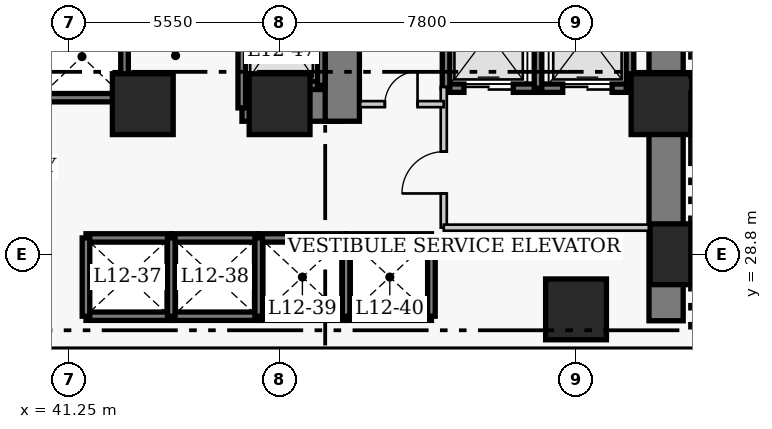
"""IFC4 building model, lengths in metres.
Left out: names, types, materials, properties, quantities, classifications, styles, units other than length and angle.
Written with IfcOpenShell. Run it as: python <this file> out.ifc"""

import sys

from ifc_helpers import new_model, si_unit, direction, frame, frame_2d, origin, origin_2d, place, context, subcontext, project, spatial, rectangle, extrude, element, fill, save


model = new_model("IFC4")
c1 = context("Model", 3, precision=1e-05, world=origin(), true_north=direction((0.0, 1.0)))
c2 = subcontext(c1, "Body", "Model", "MODEL_VIEW")
j1 = project(units=[si_unit("LENGTHUNIT", "METRE"), si_unit("PLANEANGLEUNIT", "RADIAN")], contexts=[c1])
p1 = place(None, origin())
s1 = spatial("IfcSite", under=j1, at=p1, CompositionType="ELEMENT")
p2 = place(p1, origin())
s2 = spatial("IfcBuilding", under=s1, at=p2, CompositionType="ELEMENT")
p3 = place(p2, frame((0.0, 0.0, 52.6)))
s3 = spatial("IfcBuildingStorey", under=s2, at=p3, CompositionType="ELEMENT", Elevation=52.6)
p4 = place(p3, frame((56.97, 27.05, 0.0), z_axis=(0.0, 0.0, 1.0), x_axis=(0.0, 1.0, 0.0)))
e1 = element("IfcWall", 1, at=p4, inside=s3, PredefinedType="SHEAR", context=c2, shape_type="SweptSolid", body=[
    extrude(rectangle(XDim=13.72, YDim=0.9, at=frame_2d((6.86, 0.0))), origin(), (0.0, 0.0, 1.0), 3.8),
])
p5 = place(p3, frame((45.81, 32.75, 0.0), z_axis=(0.0, 0.0, 1.0), x_axis=(1.0, 0.0, 0.0)))
e2 = element("IfcWall", 2, at=p5, inside=s3, PredefinedType="SHEAR", context=c2, shape_type="SweptSolid", body=[
    extrude(rectangle(XDim=2.64, YDim=0.9, at=frame_2d((1.32, 0.0))), origin(), (0.0, 0.0, 1.0), 3.8),
])
p6 = place(p3, frame((48.45, 32.3, 0.0), z_axis=(0.0, 0.0, 1.0), x_axis=(0.0, 1.0, 0.0)))
e3 = element("IfcWall", 3, at=p6, inside=s3, PredefinedType="SHEAR", context=c2, shape_type="SweptSolid", body=[
    extrude(rectangle(XDim=8.02, YDim=0.9, at=frame_2d((4.01, 0.0))), origin(), (0.0, 0.0, 1.0), 3.8),
])
p7 = place(p6, frame((5.9, 0.0, 0.0)))
e4 = element("IfcOpeningElement", 4, at=p7, cuts=e3, PredefinedType="OPENING", context=c2, shape_type="SweptSolid", body=[
    extrude(rectangle(XDim=1.1, YDim=2.15, at=frame_2d((0.55, 1.075))), frame((0.0, 0.46, 0.0), z_axis=(0.0, -1.0, 0.0), x_axis=(1.0, 0.0, 0.0)), (0.0, 0.0, 1.0), 0.92),
])
for number, where, z_axis, x_axis in (
    (5, (57.35, 28.8, 0.0), (0.0, 0.0, 1.0), (1.0, 0.0, 0.0)),
    (6, (43.2, 32.75, 0.0), (0.0, 0.0, 1.0), (1.0, 0.0, 0.0)),
    (7, (46.8, 32.75, 0.0), (0.0, 0.0, 1.0), (1.0, 0.0, 0.0)),
    (8, (54.6, 27.35, 0.0), (0.0, 0.0, 1.0), (1.0, 0.0, 0.0)),
    (9, (56.85, 32.75, 0.0), (0.0, 0.0, 1.0), (1.0, 0.0, 0.0)),
):
    element("IfcColumn", number, at=place(p3, frame(where, z_axis=z_axis, x_axis=x_axis)), inside=s3, PredefinedType="COLUMN", context=c2, shape_type="SweptSolid", body=[
        extrude(rectangle(XDim=1.6, YDim=1.6, at=origin_2d()), origin(), (0.0, 0.0, 1.0), 3.8),
    ])
for number, where, z_axis, x_axis in (
    (10, (41.705, 29.23, 0.0), (0.0, 0.0, 1.0), (1.0, 0.0, 0.0)),
    (11, (41.705, 27.17, 0.0), (0.0, 0.0, 1.0), (1.0, 0.0, 0.0)),
):
    element("IfcWall", number, at=place(p3, frame(where, z_axis=z_axis, x_axis=x_axis)), inside=s3, PredefinedType="SHEAR", context=c2, shape_type="SweptSolid", body=[
        extrude(rectangle(XDim=2.245, YDim=0.22, at=frame_2d((1.123, 0.0))), origin(), (0.0, 0.0, 1.0), 3.8),
    ])
p8 = place(p3, frame((41.705, 27.17, 0.0), z_axis=(0.0, 0.0, 1.0), x_axis=(0.0, 1.0, 0.0)))
e12 = element("IfcWall", 12, at=p8, inside=s3, PredefinedType="SHEAR", context=c2, shape_type="SweptSolid", body=[
    extrude(rectangle(XDim=2.06, YDim=0.2, at=frame_2d((1.03, 0.0))), origin(), (0.0, 0.0, 1.0), 3.8),
])
for number, where, z_axis, x_axis in (
    (13, (43.95, 29.23, 0.0), (0.0, 0.0, 1.0), (1.0, 0.0, 0.0)),
    (14, (43.95, 27.17, 0.0), (0.0, 0.0, 1.0), (1.0, 0.0, 0.0)),
):
    element("IfcWall", number, at=place(p3, frame(where, z_axis=z_axis, x_axis=x_axis)), inside=s3, PredefinedType="SHEAR", context=c2, shape_type="SweptSolid", body=[
        extrude(rectangle(XDim=2.3, YDim=0.22, at=frame_2d((1.15, 0.0))), origin(), (0.0, 0.0, 1.0), 3.8),
    ])
p9 = place(p3, frame((43.95, 27.17, 0.0), z_axis=(0.0, 0.0, 1.0), x_axis=(0.0, 1.0, 0.0)))
e15 = element("IfcWall", 15, at=p9, inside=s3, PredefinedType="SHEAR", context=c2, shape_type="SweptSolid", body=[
    extrude(rectangle(XDim=2.06, YDim=0.2, at=frame_2d((1.03, 0.0))), origin(), (0.0, 0.0, 1.0), 3.8),
])
for number, where, z_axis, x_axis in (
    (16, (46.25, 29.23, 0.0), (0.0, 0.0, 1.0), (1.0, 0.0, 0.0)),
    (17, (46.25, 27.17, 0.0), (0.0, 0.0, 1.0), (1.0, 0.0, 0.0)),
):
    element("IfcWall", number, at=place(p3, frame(where, z_axis=z_axis, x_axis=x_axis)), inside=s3, PredefinedType="SHEAR", context=c2, shape_type="SweptSolid", body=[
        extrude(rectangle(XDim=2.3, YDim=0.22, at=frame_2d((1.15, 0.0))), origin(), (0.0, 0.0, 1.0), 3.8),
    ])
p10 = place(p3, frame((46.25, 27.17, 0.0), z_axis=(0.0, 0.0, 1.0), x_axis=(0.0, 1.0, 0.0)))
e18 = element("IfcWall", 18, at=p10, inside=s3, PredefinedType="SHEAR", context=c2, shape_type="SweptSolid", body=[
    extrude(rectangle(XDim=2.06, YDim=0.2, at=frame_2d((1.03, 0.0))), origin(), (0.0, 0.0, 1.0), 3.8),
])
for number, where, z_axis, x_axis in (
    (19, (48.55, 29.23, 0.0), (0.0, 0.0, 1.0), (1.0, 0.0, 0.0)),
    (20, (48.55, 27.17, 0.0), (0.0, 0.0, 1.0), (1.0, 0.0, 0.0)),
):
    element("IfcWall", number, at=place(p3, frame(where, z_axis=z_axis, x_axis=x_axis)), inside=s3, PredefinedType="SHEAR", context=c2, shape_type="SweptSolid", body=[
        extrude(rectangle(XDim=2.245, YDim=0.22, at=frame_2d((1.123, 0.0))), origin(), (0.0, 0.0, 1.0), 3.8),
    ])
for number, where, z_axis, x_axis in (
    (21, (48.55, 27.17, 0.0), (0.0, 0.0, 1.0), (0.0, 1.0, 0.0)),
    (22, (50.795, 27.17, 0.0), (0.0, 0.0, 1.0), (0.0, 1.0, 0.0)),
):
    element("IfcWall", number, at=place(p3, frame(where, z_axis=z_axis, x_axis=x_axis)), inside=s3, PredefinedType="SHEAR", context=c2, shape_type="SweptSolid", body=[
        extrude(rectangle(XDim=2.06, YDim=0.2, at=frame_2d((1.03, 0.0))), origin(), (0.0, 0.0, 1.0), 3.8),
    ])
p11 = place(p3, frame((40.4, 32.92, 0.0), z_axis=(0.0, 0.0, 1.0), x_axis=(1.0, 0.0, 0.0)))
e23 = element("IfcWall", 23, at=p11, inside=s3, PredefinedType="SHEAR", context=c2, shape_type="SweptSolid", body=[
    extrude(rectangle(XDim=2.32, YDim=0.22, at=frame_2d((1.16, 0.0))), origin(), (0.0, 0.0, 1.0), 3.8),
])
p12 = place(p3, frame((42.72, 32.92, 0.0), z_axis=(0.0, 0.0, 1.0), x_axis=(0.0, 1.0, 0.0)))
e24 = element("IfcWall", 24, at=p12, inside=s3, PredefinedType="SHEAR", context=c2, shape_type="SweptSolid", body=[
    extrude(rectangle(XDim=2.16, YDim=0.2, at=frame_2d((1.08, 0.0))), origin(), (0.0, 0.0, 1.0), 3.8),
])
p13 = place(p3, frame((51.18, 33.17, 0.0), z_axis=(0.0, 0.0, 1.0), x_axis=(1.0, 0.0, 0.0)))
e25 = element("IfcWall", 25, at=p13, inside=s3, PredefinedType="SHEAR", context=c2, shape_type="SweptSolid", body=[
    extrude(rectangle(XDim=2.42, YDim=0.22, at=frame_2d((1.21, 0.0))), origin(), (0.0, 0.0, 1.0), 3.8),
])
p14 = place(p13, frame((0.47, 0.0, 0.0)))
e26 = element("IfcOpeningElement", 26, at=p14, cuts=e25, PredefinedType="OPENING", context=c2, shape_type="SweptSolid", body=[
    extrude(rectangle(XDim=1.3, YDim=2.15, at=frame_2d((0.65, 1.075))), frame((0.0, 0.12, 0.0), z_axis=(0.0, -1.0, 0.0), x_axis=(1.0, 0.0, 0.0)), (0.0, 0.0, 1.0), 0.24),
])
p15 = place(p3, frame((51.18, 33.17, 0.0), z_axis=(0.0, 0.0, 1.0), x_axis=(0.0, 1.0, 0.0)))
e27 = element("IfcWall", 27, at=p15, inside=s3, PredefinedType="SHEAR", context=c2, shape_type="SweptSolid", body=[
    extrude(rectangle(XDim=2.86, YDim=0.2, at=frame_2d((1.43, 0.0))), origin(), (0.0, 0.0, 1.0), 3.8),
])
p16 = place(p3, frame((53.6, 33.17, 0.0), z_axis=(0.0, 0.0, 1.0), x_axis=(1.0, 0.0, 0.0)))
e28 = element("IfcWall", 28, at=p16, inside=s3, PredefinedType="SHEAR", context=c2, shape_type="SweptSolid", body=[
    extrude(rectangle(XDim=2.42, YDim=0.22, at=frame_2d((1.21, 0.0))), origin(), (0.0, 0.0, 1.0), 3.8),
])
p17 = place(p16, frame((0.65, 0.0, 0.0)))
e29 = element("IfcOpeningElement", 29, at=p17, cuts=e28, PredefinedType="OPENING", context=c2, shape_type="SweptSolid", body=[
    extrude(rectangle(XDim=1.3, YDim=2.15, at=frame_2d((0.65, 1.075))), frame((0.0, 0.12, 0.0), z_axis=(0.0, -1.0, 0.0), x_axis=(1.0, 0.0, 0.0)), (0.0, 0.0, 1.0), 0.24),
])
for number, where, z_axis, x_axis in (
    (30, (53.6, 33.17, 0.0), (0.0, 0.0, 1.0), (0.0, 1.0, 0.0)),
    (31, (56.02, 33.17, 0.0), (0.0, 0.0, 1.0), (0.0, 1.0, 0.0)),
):
    element("IfcWall", number, at=place(p3, frame(where, z_axis=z_axis, x_axis=x_axis)), inside=s3, PredefinedType="SHEAR", context=c2, shape_type="SweptSolid", body=[
        extrude(rectangle(XDim=2.86, YDim=0.2, at=frame_2d((1.43, 0.0))), origin(), (0.0, 0.0, 1.0), 3.8),
    ])
p18 = place(p3, frame((45.805, 33.245, 0.0), z_axis=(0.0, 0.0, 1.0), x_axis=(1.0, 0.0, 0.0)))
e32 = element("IfcWall", 32, at=p18, inside=s3, PredefinedType="SHEAR", context=c2, shape_type="SweptSolid", body=[
    extrude(rectangle(XDim=2.09, YDim=0.22, at=frame_2d((1.045, 0.0))), origin(), (0.0, 0.0, 1.0), 3.8),
])
p19 = place(p3, frame((45.805, 32.65, 0.0), z_axis=(0.0, 0.0, 1.0), x_axis=(0.0, 1.0, 0.0)))
e33 = element("IfcWall", 33, at=p19, inside=s3, PredefinedType="SHEAR", context=c2, shape_type="SweptSolid", body=[
    extrude(rectangle(XDim=3.505, YDim=0.2, at=frame_2d((1.752, 0.0))), origin(), (0.0, 0.0, 1.0), 3.8),
])
p20 = place(p3, frame((47.895, 33.245, 0.0), z_axis=(0.0, 0.0, 1.0), x_axis=(0.0, 1.0, 0.0)))
e34 = element("IfcWall", 34, at=p20, inside=s3, PredefinedType="SHEAR", context=c2, shape_type="SweptSolid", body=[
    extrude(rectangle(XDim=2.91, YDim=0.2, at=frame_2d((1.455, 0.0))), origin(), (0.0, 0.0, 1.0), 3.8),
])
p21 = place(p3, frame((51.12, 29.5, 0.0), z_axis=(0.0, 0.0, 1.0), x_axis=(0.0, 1.0, 0.0)))
e35 = element("IfcWall", 35, at=p21, inside=s3, PredefinedType="PARTITIONING", context=c2, shape_type="SweptSolid", body=[
    extrude(rectangle(XDim=3.7, YDim=0.16, at=frame_2d((1.85, 0.0))), origin(), (0.0, 0.0, 1.0), 3.54),
])
p22 = place(p21, frame((0.9, 0.0, 0.0)))
e36 = element("IfcOpeningElement", 36, at=p22, cuts=e35, PredefinedType="OPENING", context=c2, shape_type="SweptSolid", body=[
    extrude(rectangle(XDim=1.1, YDim=2.15, at=frame_2d((0.55, 1.075))), frame((0.0, 0.09, 0.0), z_axis=(0.0, -1.0, 0.0), x_axis=(1.0, 0.0, 0.0)), (0.0, 0.0, 1.0), 0.18),
])
p23 = place(p3, frame((51.12, 29.5, 0.0), z_axis=(0.0, 0.0, 1.0), x_axis=(1.0, 0.0, 0.0)))
e37 = element("IfcWall", 37, at=p23, inside=s3, PredefinedType="PARTITIONING", context=c2, shape_type="SweptSolid", body=[
    extrude(rectangle(XDim=5.63, YDim=0.16, at=frame_2d((2.815, 0.0))), origin(), (0.0, 0.0, 1.0), 3.54),
])
p24 = place(p3, frame((48.92, 32.75, 0.0), z_axis=(0.0, 0.0, 1.0), x_axis=(1.0, 0.0, 0.0)))
e38 = element("IfcWall", 38, at=p24, inside=s3, PredefinedType="PARTITIONING", context=c2, shape_type="SweptSolid", body=[
    extrude(rectangle(XDim=2.2, YDim=0.16, at=frame_2d((1.1, 0.0))), origin(), (0.0, 0.0, 1.0), 3.54),
])
p25 = place(p24, frame((0.65, 0.0, 0.0)))
e39 = element("IfcOpeningElement", 39, at=p25, cuts=e38, PredefinedType="OPENING", context=c2, shape_type="SweptSolid", body=[
    extrude(rectangle(XDim=0.86, YDim=2.05, at=frame_2d((0.43, 1.025))), frame((0.0, 0.09, 0.0), z_axis=(0.0, -1.0, 0.0), x_axis=(1.0, 0.0, 0.0)), (0.0, 0.0, 1.0), 0.18),
])
p26 = place(p3, frame((35.85, 26.26, 0.0), z_axis=(0.0, 0.0, 1.0), x_axis=(1.0, 0.0, 0.0)))
e40 = element("IfcWall", 40, at=p26, inside=s3, PredefinedType="PARTITIONING", context=c2, shape_type="SweptSolid", body=[
    extrude(rectangle(XDim=23.45, YDim=0.16, at=frame_2d((11.725, 0.0))), origin(), (0.0, 0.0, 1.0), 3.54),
])
p27 = place(p14, origin())
e41 = element("IfcDoor", 41, at=p27, inside=s3, OperationType="DOUBLE_DOOR_SLIDING", PredefinedType="DOOR", context=c2, shape_type="SweptSolid", body=[
    extrude(rectangle(XDim=1.3, YDim=2.15, at=frame_2d((0.65, 1.075))), frame((0.0, 0.025, 0.0), z_axis=(0.0, -1.0, 0.0), x_axis=(1.0, 0.0, 0.0)), (0.0, 0.0, 1.0), 0.05),
])
fill(e26, e41)
p28 = place(p17, origin())
e42 = element("IfcDoor", 42, at=p28, inside=s3, OperationType="DOUBLE_DOOR_SLIDING", PredefinedType="DOOR", context=c2, shape_type="SweptSolid", body=[
    extrude(rectangle(XDim=1.3, YDim=2.15, at=frame_2d((0.65, 1.075))), frame((0.0, 0.025, 0.0), z_axis=(0.0, -1.0, 0.0), x_axis=(1.0, 0.0, 0.0)), (0.0, 0.0, 1.0), 0.05),
])
fill(e29, e42)
p29 = place(p22, origin())
e43 = element("IfcDoor", 43, at=p29, inside=s3, OperationType="SINGLE_SWING_LEFT", PredefinedType="DOOR", context=c2, shape_type="SweptSolid", body=[
    extrude(rectangle(XDim=1.1, YDim=2.15, at=frame_2d((0.55, 1.075))), frame((0.0, 0.025, 0.0), z_axis=(0.0, -1.0, 0.0), x_axis=(1.0, 0.0, 0.0)), (0.0, 0.0, 1.0), 0.05),
])
fill(e36, e43)
p30 = place(p25, origin())
e44 = element("IfcDoor", 44, at=p30, inside=s3, OperationType="SINGLE_SWING_RIGHT", PredefinedType="DOOR", context=c2, shape_type="SweptSolid", body=[
    extrude(rectangle(XDim=0.86, YDim=2.05, at=frame_2d((0.43, 1.025))), frame((0.0, 0.025, 0.0), z_axis=(0.0, -1.0, 0.0), x_axis=(1.0, 0.0, 0.0)), (0.0, 0.0, 1.0), 0.05),
])
fill(e39, e44)
save(model, sys.argv[1])
